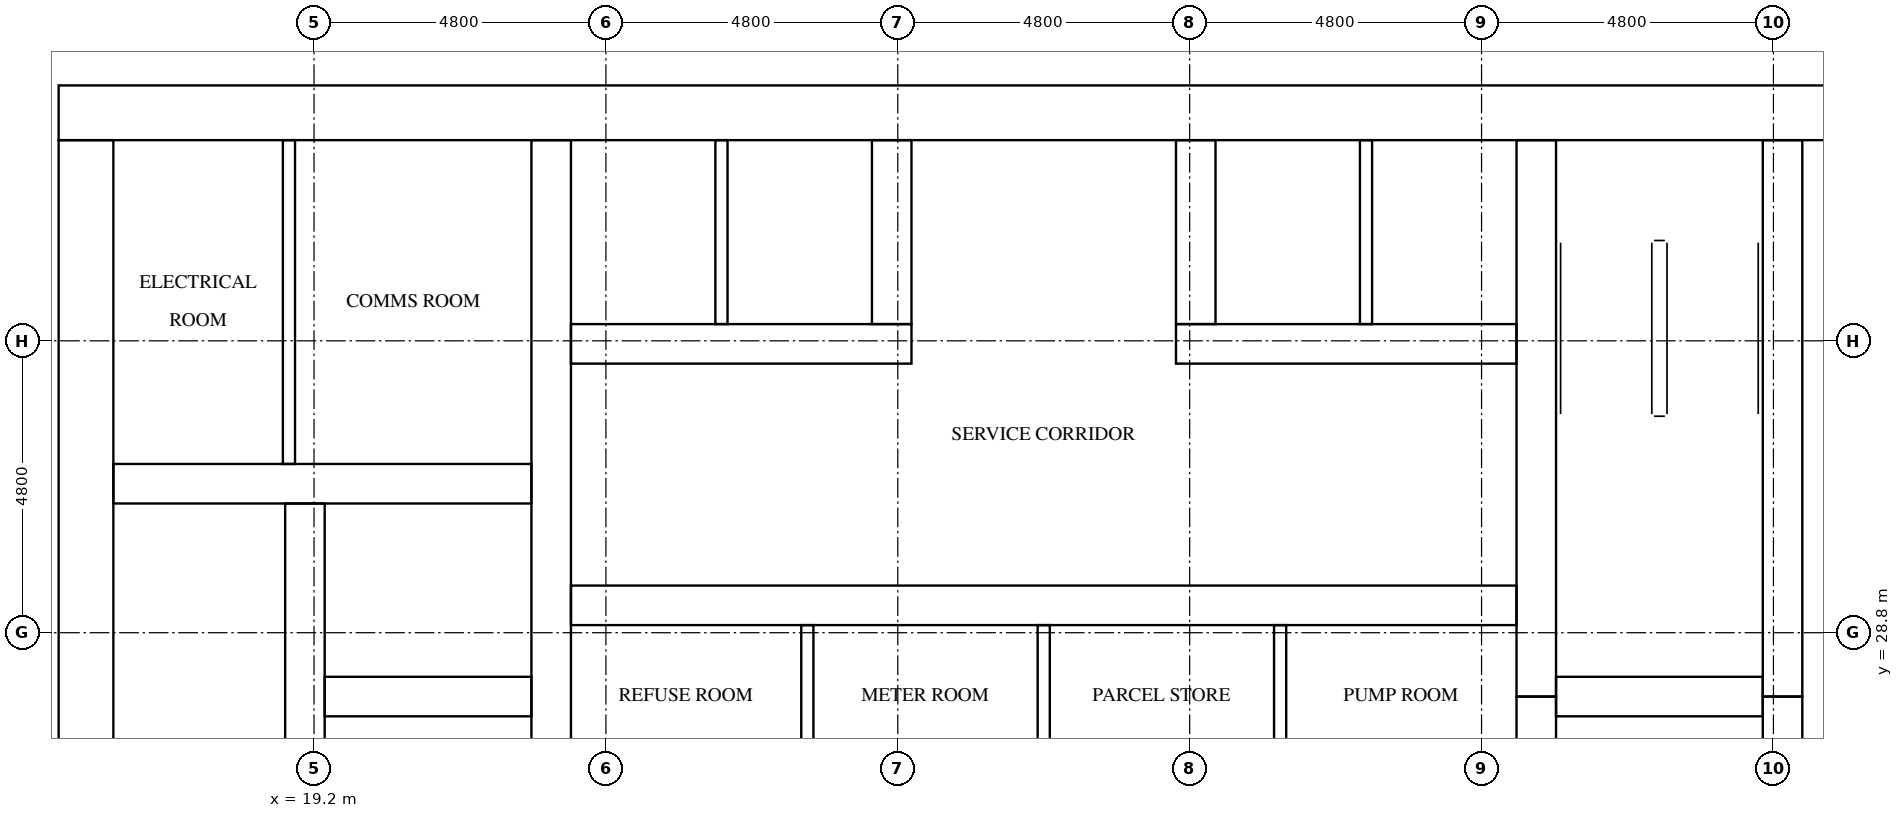
"""IFC4 building model, lengths in metres.
Left out: names, types, materials, properties, quantities, classifications, styles, units other than length and angle.
Written with IfcOpenShell. Run it as: python <this file> out.ifc"""

import sys

from ifc_helpers import new_model, si_unit, direction, frame, frame_2d, origin, place, context, subcontext, project, spatial, rectangle, extrude, element, fill, save


model = new_model("IFC4")
c1 = context("Model", 3, precision=1e-05, world=origin(), true_north=direction((0.0, 1.0)))
c2 = subcontext(c1, "Body", "Model", "MODEL_VIEW")
j1 = project(units=[si_unit("LENGTHUNIT", "METRE"), si_unit("PLANEANGLEUNIT", "RADIAN")], contexts=[c1])
p1 = place(None, origin())
s1 = spatial("IfcSite", under=j1, at=p1, CompositionType="ELEMENT")
p2 = place(p1, origin())
s2 = spatial("IfcBuilding", under=s1, at=p2, CompositionType="ELEMENT")
p3 = place(p2, frame((0.0, 0.0, 80.3)))
s3 = spatial("IfcBuildingStorey", under=s2, at=p3, CompositionType="ELEMENT", Elevation=80.3)
p4 = place(p3, frame((15.0, 37.35, 0.0), z_axis=(0.0, 0.0, 1.0), x_axis=(1.0, 0.0, 0.0)))
e1 = element("IfcWall", 1, at=p4, inside=s3, PredefinedType="SHEAR", context=c2, shape_type="SweptSolid", body=[
    extrude(rectangle(XDim=32.4, YDim=0.9, at=frame_2d((16.2, 0.0))), origin(), (0.0, 0.0, 1.0), 3.1),
])
p5 = place(p4, frame((15.3, 0.0, 0.0)))
e2 = element("IfcOpeningElement", 2, at=p5, cuts=e1, PredefinedType="OPENING", context=c2, shape_type="SweptSolid", body=[
    extrude(rectangle(XDim=1.8, YDim=2.1, at=frame_2d((0.9, 1.05))), frame((0.0, 0.46, 0.0), z_axis=(0.0, -1.0, 0.0), x_axis=(1.0, 0.0, 0.0)), (0.0, 0.0, 1.0), 0.92),
])
p6 = place(p4, frame((1.794, 0.0, 0.0)))
e3 = element("IfcOpeningElement", 3, at=p6, cuts=e1, PredefinedType="OPENING", context=c2, shape_type="SweptSolid", body=[
    extrude(rectangle(XDim=1.0, YDim=2.1, at=frame_2d((0.5, 1.05))), frame((0.0, 0.46, 0.0), z_axis=(0.0, -1.0, 0.0), x_axis=(1.0, 0.0, 0.0)), (0.0, 0.0, 1.0), 0.92),
])
p7 = place(p4, frame((5.331, 0.0, 0.0)))
e4 = element("IfcOpeningElement", 4, at=p7, cuts=e1, PredefinedType="OPENING", context=c2, shape_type="SweptSolid", body=[
    extrude(rectangle(XDim=1.0, YDim=2.1, at=frame_2d((0.5, 1.05))), frame((0.0, 0.46, 0.0), z_axis=(0.0, -1.0, 0.0), x_axis=(1.0, 0.0, 0.0)), (0.0, 0.0, 1.0), 0.92),
])
p8 = place(p3, frame((15.45, 15.9, 0.0), z_axis=(0.0, 0.0, 1.0), x_axis=(0.0, 1.0, 0.0)))
e5 = element("IfcWall", 5, at=p8, inside=s3, PredefinedType="SHEAR", context=c2, shape_type="SweptSolid", body=[
    extrude(rectangle(XDim=21.0, YDim=0.9, at=frame_2d((10.5, 0.0))), origin(), (0.0, 0.0, 1.0), 3.1),
])
p9 = place(p8, frame((4.86, 0.0, 0.0)))
e6 = element("IfcOpeningElement", 6, at=p9, cuts=e5, PredefinedType="OPENING", context=c2, shape_type="SweptSolid", body=[
    extrude(rectangle(XDim=1.2, YDim=2.1, at=frame_2d((0.6, 1.05))), frame((0.0, 0.46, 0.0), z_axis=(0.0, -1.0, 0.0), x_axis=(1.0, 0.0, 0.0)), (0.0, 0.0, 1.0), 0.92),
])
p10 = place(p3, frame((19.05, 15.9, 0.0), z_axis=(0.0, 0.0, 1.0), x_axis=(0.0, 1.0, 0.0)))
e7 = element("IfcWall", 7, at=p10, inside=s3, PredefinedType="SHEAR", context=c2, shape_type="SweptSolid", body=[
    extrude(rectangle(XDim=15.025, YDim=0.65, at=frame_2d((7.513, 0.0))), origin(), (0.0, 0.0, 1.0), 3.1),
])
p11 = place(p10, frame((9.55, 0.0, 0.0)))
e8 = element("IfcOpeningElement", 8, at=p11, cuts=e7, PredefinedType="OPENING", context=c2, shape_type="SweptSolid", body=[
    extrude(rectangle(XDim=1.1, YDim=2.1, at=frame_2d((0.55, 1.05))), frame((0.0, 0.335, 0.0), z_axis=(0.0, -1.0, 0.0), x_axis=(1.0, 0.0, 0.0)), (0.0, 0.0, 1.0), 0.67),
])
p12 = place(p10, frame((13.05, 0.0, 0.0)))
e9 = element("IfcOpeningElement", 9, at=p12, cuts=e7, PredefinedType="OPENING", context=c2, shape_type="SweptSolid", body=[
    extrude(rectangle(XDim=1.1, YDim=2.1, at=frame_2d((0.55, 1.05))), frame((0.0, 0.335, 0.0), z_axis=(0.0, -1.0, 0.0), x_axis=(1.0, 0.0, 0.0)), (0.0, 0.0, 1.0), 0.67),
])
p13 = place(p10, frame((0.3, 0.0, 0.0)))
e10 = element("IfcOpeningElement", 10, at=p13, cuts=e7, PredefinedType="OPENING", context=c2, shape_type="SweptSolid", body=[
    extrude(rectangle(XDim=1.2, YDim=2.1, at=frame_2d((0.6, 1.05))), frame((0.0, 0.335, 0.0), z_axis=(0.0, -1.0, 0.0), x_axis=(1.0, 0.0, 0.0)), (0.0, 0.0, 1.0), 0.67),
])
p14 = place(p3, frame((23.1, 15.9, 0.0), z_axis=(0.0, 0.0, 1.0), x_axis=(0.0, 1.0, 0.0)))
e11 = element("IfcWall", 11, at=p14, inside=s3, PredefinedType="SHEAR", context=c2, shape_type="SweptSolid", body=[
    extrude(rectangle(XDim=21.0, YDim=0.65, at=frame_2d((10.5, 0.0))), origin(), (0.0, 0.0, 1.0), 3.1),
])
p15 = place(p3, frame((39.3, 24.25, 0.0), z_axis=(0.0, 0.0, 1.0), x_axis=(0.0, 1.0, 0.0)))
e12 = element("IfcWall", 12, at=p15, inside=s3, PredefinedType="SHEAR", context=c2, shape_type="SweptSolid", body=[
    extrude(rectangle(XDim=3.5, YDim=0.65, at=frame_2d((1.75, 0.0))), origin(), (0.0, 0.0, 1.0), 3.1),
])
p16 = place(p3, frame((39.3, 27.75, 0.0), z_axis=(0.0, 0.0, 1.0), x_axis=(0.0, 1.0, 0.0)))
e13 = element("IfcWall", 13, at=p16, inside=s3, PredefinedType="SHEAR", context=c2, shape_type="SweptSolid", body=[
    extrude(rectangle(XDim=9.15, YDim=0.65, at=frame_2d((4.575, 0.0))), origin(), (0.0, 0.0, 1.0), 3.1),
])
p17 = place(p3, frame((43.35, 24.25, 0.0), z_axis=(0.0, 0.0, 1.0), x_axis=(0.0, 1.0, 0.0)))
e14 = element("IfcWall", 14, at=p17, inside=s3, PredefinedType="SHEAR", context=c2, shape_type="SweptSolid", body=[
    extrude(rectangle(XDim=3.5, YDim=0.65, at=frame_2d((1.75, 0.0))), origin(), (0.0, 0.0, 1.0), 3.1),
])
p18 = place(p17, frame((1.2, 0.0, 0.0)))
e15 = element("IfcOpeningElement", 15, at=p18, cuts=e14, PredefinedType="OPENING", context=c2, shape_type="SweptSolid", body=[
    extrude(rectangle(XDim=1.1, YDim=2.1, at=frame_2d((0.55, 1.05))), frame((0.0, 0.335, 0.0), z_axis=(0.0, -1.0, 0.0), x_axis=(1.0, 0.0, 0.0)), (0.0, 0.0, 1.0), 0.67),
])
p19 = place(p3, frame((43.35, 27.75, 0.0), z_axis=(0.0, 0.0, 1.0), x_axis=(0.0, 1.0, 0.0)))
e16 = element("IfcWall", 16, at=p19, inside=s3, PredefinedType="SHEAR", context=c2, shape_type="SweptSolid", body=[
    extrude(rectangle(XDim=9.15, YDim=0.65, at=frame_2d((4.575, 0.0))), origin(), (0.0, 0.0, 1.0), 3.1),
])
p20 = place(p19, frame((7.65, 0.0, 0.0)))
e17 = element("IfcOpeningElement", 17, at=p20, cuts=e16, PredefinedType="OPENING", context=c2, shape_type="SweptSolid", body=[
    extrude(rectangle(XDim=1.2, YDim=2.1, at=frame_2d((0.6, 1.05))), frame((0.0, 0.335, 0.0), z_axis=(0.0, -1.0, 0.0), x_axis=(1.0, 0.0, 0.0)), (0.0, 0.0, 1.0), 0.67),
])
p21 = place(p3, frame((19.375, 27.75, 0.0), z_axis=(0.0, 0.0, 1.0), x_axis=(1.0, 0.0, 0.0)))
e18 = element("IfcWall", 18, at=p21, inside=s3, PredefinedType="SHEAR", context=c2, shape_type="SweptSolid", body=[
    extrude(rectangle(XDim=3.4, YDim=0.65, at=frame_2d((1.7, 0.0))), origin(), (0.0, 0.0, 1.0), 3.1),
])
p22 = place(p3, frame((15.9, 31.25, 0.0), z_axis=(0.0, 0.0, 1.0), x_axis=(1.0, 0.0, 0.0)))
e19 = element("IfcWall", 19, at=p22, inside=s3, PredefinedType="SHEAR", context=c2, shape_type="SweptSolid", body=[
    extrude(rectangle(XDim=6.875, YDim=0.65, at=frame_2d((3.438, 0.0))), origin(), (0.0, 0.0, 1.0), 3.1),
])
p23 = place(p3, frame((39.625, 27.75, 0.0), z_axis=(0.0, 0.0, 1.0), x_axis=(1.0, 0.0, 0.0)))
e20 = element("IfcWall", 20, at=p23, inside=s3, PredefinedType="SHEAR", context=c2, shape_type="SweptSolid", body=[
    extrude(rectangle(XDim=3.4, YDim=0.65, at=frame_2d((1.7, 0.0))), origin(), (0.0, 0.0, 1.0), 3.1),
])
p24 = place(p3, frame((23.425, 29.25, 0.0), z_axis=(0.0, 0.0, 1.0), x_axis=(1.0, 0.0, 0.0)))
e21 = element("IfcWall", 21, at=p24, inside=s3, PredefinedType="SHEAR", context=c2, shape_type="SweptSolid", body=[
    extrude(rectangle(XDim=15.55, YDim=0.65, at=frame_2d((7.775, 0.0))), origin(), (0.0, 0.0, 1.0), 3.1),
])
p25 = place(p24, frame((1.394, 0.0, 0.0)))
e22 = element("IfcOpeningElement", 22, at=p25, cuts=e21, PredefinedType="OPENING", context=c2, shape_type="SweptSolid", body=[
    extrude(rectangle(XDim=1.0, YDim=2.1, at=frame_2d((0.5, 1.05))), frame((0.0, 0.335, 0.0), z_axis=(0.0, -1.0, 0.0), x_axis=(1.0, 0.0, 0.0)), (0.0, 0.0, 1.0), 0.67),
])
p26 = place(p24, frame((5.331, 0.0, 0.0)))
e23 = element("IfcOpeningElement", 23, at=p26, cuts=e21, PredefinedType="OPENING", context=c2, shape_type="SweptSolid", body=[
    extrude(rectangle(XDim=1.0, YDim=2.1, at=frame_2d((0.5, 1.05))), frame((0.0, 0.335, 0.0), z_axis=(0.0, -1.0, 0.0), x_axis=(1.0, 0.0, 0.0)), (0.0, 0.0, 1.0), 0.67),
])
p27 = place(p24, frame((9.219, 0.0, 0.0)))
e24 = element("IfcOpeningElement", 24, at=p27, cuts=e21, PredefinedType="OPENING", context=c2, shape_type="SweptSolid", body=[
    extrude(rectangle(XDim=1.0, YDim=2.1, at=frame_2d((0.5, 1.05))), frame((0.0, 0.335, 0.0), z_axis=(0.0, -1.0, 0.0), x_axis=(1.0, 0.0, 0.0)), (0.0, 0.0, 1.0), 0.67),
])
p28 = place(p24, frame((13.156, 0.0, 0.0)))
e25 = element("IfcOpeningElement", 25, at=p28, cuts=e21, PredefinedType="OPENING", context=c2, shape_type="SweptSolid", body=[
    extrude(rectangle(XDim=1.0, YDim=2.1, at=frame_2d((0.5, 1.05))), frame((0.0, 0.335, 0.0), z_axis=(0.0, -1.0, 0.0), x_axis=(1.0, 0.0, 0.0)), (0.0, 0.0, 1.0), 0.67),
])
p29 = place(p3, frame((23.425, 33.55, 0.0), z_axis=(0.0, 0.0, 1.0), x_axis=(1.0, 0.0, 0.0)))
e26 = element("IfcWall", 26, at=p29, inside=s3, PredefinedType="SHEAR", context=c2, shape_type="SweptSolid", body=[
    extrude(rectangle(XDim=5.6, YDim=0.65, at=frame_2d((2.8, 0.0))), origin(), (0.0, 0.0, 1.0), 3.1),
])
p30 = place(p3, frame((33.375, 33.55, 0.0), z_axis=(0.0, 0.0, 1.0), x_axis=(1.0, 0.0, 0.0)))
e27 = element("IfcWall", 27, at=p30, inside=s3, PredefinedType="SHEAR", context=c2, shape_type="SweptSolid", body=[
    extrude(rectangle(XDim=5.6, YDim=0.65, at=frame_2d((2.8, 0.0))), origin(), (0.0, 0.0, 1.0), 3.1),
])
for number, where, z_axis, x_axis in (
    (28, (28.7, 33.875, 0.0), (0.0, 0.0, 1.0), (0.0, 1.0, 0.0)),
    (29, (33.7, 33.875, 0.0), (0.0, 0.0, 1.0), (0.0, 1.0, 0.0)),
):
    element("IfcWall", number, at=place(p3, frame(where, z_axis=z_axis, x_axis=x_axis)), inside=s3, PredefinedType="SHEAR", context=c2, shape_type="SweptSolid", body=[
        extrude(rectangle(XDim=3.025, YDim=0.65, at=frame_2d((1.512, 0.0))), origin(), (0.0, 0.0, 1.0), 3.1),
    ])
for number, where, z_axis, x_axis in (
    (30, (25.9, 33.875, 0.0), (0.0, 0.0, 1.0), (0.0, 1.0, 0.0)),
    (31, (36.5, 33.875, 0.0), (0.0, 0.0, 1.0), (0.0, 1.0, 0.0)),
):
    element("IfcWall", number, at=place(p3, frame(where, z_axis=z_axis, x_axis=x_axis)), inside=s3, PredefinedType="SOLIDWALL", context=c2, shape_type="SweptSolid", body=[
        extrude(rectangle(XDim=3.025, YDim=0.2, at=frame_2d((1.512, 0.0))), origin(), (0.0, 0.0, 1.0), 3.1),
    ])
p31 = place(p3, frame((18.788, 31.575, 0.0), z_axis=(0.0, 0.0, 1.0), x_axis=(0.0, 1.0, 0.0)))
e32 = element("IfcWall", 32, at=p31, inside=s3, PredefinedType="PARTITIONING", context=c2, shape_type="SweptSolid", body=[
    extrude(rectangle(XDim=5.325, YDim=0.2, at=frame_2d((2.663, 0.0))), origin(), (0.0, 0.0, 1.0), 3.1),
])
for number, where, z_axis, x_axis in (
    (33, (27.312, 26.475, 0.0), (0.0, 0.0, 1.0), (0.0, 1.0, 0.0)),
    (34, (31.2, 26.475, 0.0), (0.0, 0.0, 1.0), (0.0, 1.0, 0.0)),
    (35, (35.087, 26.475, 0.0), (0.0, 0.0, 1.0), (0.0, 1.0, 0.0)),
):
    element("IfcWall", number, at=place(p3, frame(where, z_axis=z_axis, x_axis=x_axis)), inside=s3, PredefinedType="PARTITIONING", context=c2, shape_type="SweptSolid", body=[
        extrude(rectangle(XDim=2.45, YDim=0.2, at=frame_2d((1.225, 0.0))), origin(), (0.0, 0.0, 1.0), 3.1),
    ])
p32 = place(p12, origin())
e36 = element("IfcDoor", 36, at=p32, inside=s3, OperationType="DOUBLE_DOOR_SLIDING", PredefinedType="DOOR", context=c2, shape_type="SweptSolid", body=[
    extrude(rectangle(XDim=1.1, YDim=2.1, at=frame_2d((0.55, 1.05))), frame((0.0, 0.025, 0.0), z_axis=(0.0, -1.0, 0.0), x_axis=(1.0, 0.0, 0.0)), (0.0, 0.0, 1.0), 0.05),
])
fill(e9, e36)
p33 = place(p20, origin())
e37 = element("IfcDoor", 37, at=p33, inside=s3, OperationType="SINGLE_SWING_RIGHT", PredefinedType="DOOR", context=c2, shape_type="SweptSolid", body=[
    extrude(rectangle(XDim=1.2, YDim=2.1, at=frame_2d((0.6, 1.05))), frame((0.0, 0.025, 0.0), z_axis=(0.0, -1.0, 0.0), x_axis=(1.0, 0.0, 0.0)), (0.0, 0.0, 1.0), 0.05),
])
fill(e17, e37)
p34 = place(p5, origin())
e38 = element("IfcDoor", 38, at=p34, inside=s3, OperationType="DOUBLE_DOOR_SINGLE_SWING", PredefinedType="DOOR", context=c2, shape_type="SweptSolid", body=[
    extrude(rectangle(XDim=1.8, YDim=2.1, at=frame_2d((0.9, 1.05))), frame((0.0, 0.025, 0.0), z_axis=(0.0, -1.0, 0.0), x_axis=(1.0, 0.0, 0.0)), (0.0, 0.0, 1.0), 0.05),
])
fill(e2, e38)
p35 = place(p6, origin())
e39 = element("IfcDoor", 39, at=p35, inside=s3, OperationType="SINGLE_SWING_LEFT", PredefinedType="DOOR", context=c2, shape_type="SweptSolid", body=[
    extrude(rectangle(XDim=1.0, YDim=2.1, at=frame_2d((0.5, 1.05))), frame((0.0, 0.025, 0.0), z_axis=(0.0, -1.0, 0.0), x_axis=(1.0, 0.0, 0.0)), (0.0, 0.0, 1.0), 0.05),
])
fill(e3, e39)
p36 = place(p7, origin())
e40 = element("IfcDoor", 40, at=p36, inside=s3, OperationType="SINGLE_SWING_RIGHT", PredefinedType="DOOR", context=c2, shape_type="SweptSolid", body=[
    extrude(rectangle(XDim=1.0, YDim=2.1, at=frame_2d((0.5, 1.05))), frame((0.0, 0.025, 0.0), z_axis=(0.0, -1.0, 0.0), x_axis=(1.0, 0.0, 0.0)), (0.0, 0.0, 1.0), 0.05),
])
fill(e4, e40)
p37 = place(p25, origin())
e41 = element("IfcDoor", 41, at=p37, inside=s3, OperationType="SINGLE_SWING_LEFT", PredefinedType="DOOR", context=c2, shape_type="SweptSolid", body=[
    extrude(rectangle(XDim=1.0, YDim=2.1, at=frame_2d((0.5, 1.05))), frame((0.0, 0.025, 0.0), z_axis=(0.0, -1.0, 0.0), x_axis=(1.0, 0.0, 0.0)), (0.0, 0.0, 1.0), 0.05),
])
fill(e22, e41)
p38 = place(p26, origin())
e42 = element("IfcDoor", 42, at=p38, inside=s3, OperationType="SINGLE_SWING_RIGHT", PredefinedType="DOOR", context=c2, shape_type="SweptSolid", body=[
    extrude(rectangle(XDim=1.0, YDim=2.1, at=frame_2d((0.5, 1.05))), frame((0.0, 0.025, 0.0), z_axis=(0.0, -1.0, 0.0), x_axis=(1.0, 0.0, 0.0)), (0.0, 0.0, 1.0), 0.05),
])
fill(e23, e42)
p39 = place(p27, origin())
e43 = element("IfcDoor", 43, at=p39, inside=s3, OperationType="SINGLE_SWING_LEFT", PredefinedType="DOOR", context=c2, shape_type="SweptSolid", body=[
    extrude(rectangle(XDim=1.0, YDim=2.1, at=frame_2d((0.5, 1.05))), frame((0.0, 0.025, 0.0), z_axis=(0.0, -1.0, 0.0), x_axis=(1.0, 0.0, 0.0)), (0.0, 0.0, 1.0), 0.05),
])
fill(e24, e43)
p40 = place(p28, origin())
e44 = element("IfcDoor", 44, at=p40, inside=s3, OperationType="SINGLE_SWING_RIGHT", PredefinedType="DOOR", context=c2, shape_type="SweptSolid", body=[
    extrude(rectangle(XDim=1.0, YDim=2.1, at=frame_2d((0.5, 1.05))), frame((0.0, 0.025, 0.0), z_axis=(0.0, -1.0, 0.0), x_axis=(1.0, 0.0, 0.0)), (0.0, 0.0, 1.0), 0.05),
])
fill(e25, e44)
save(model, sys.argv[1])
